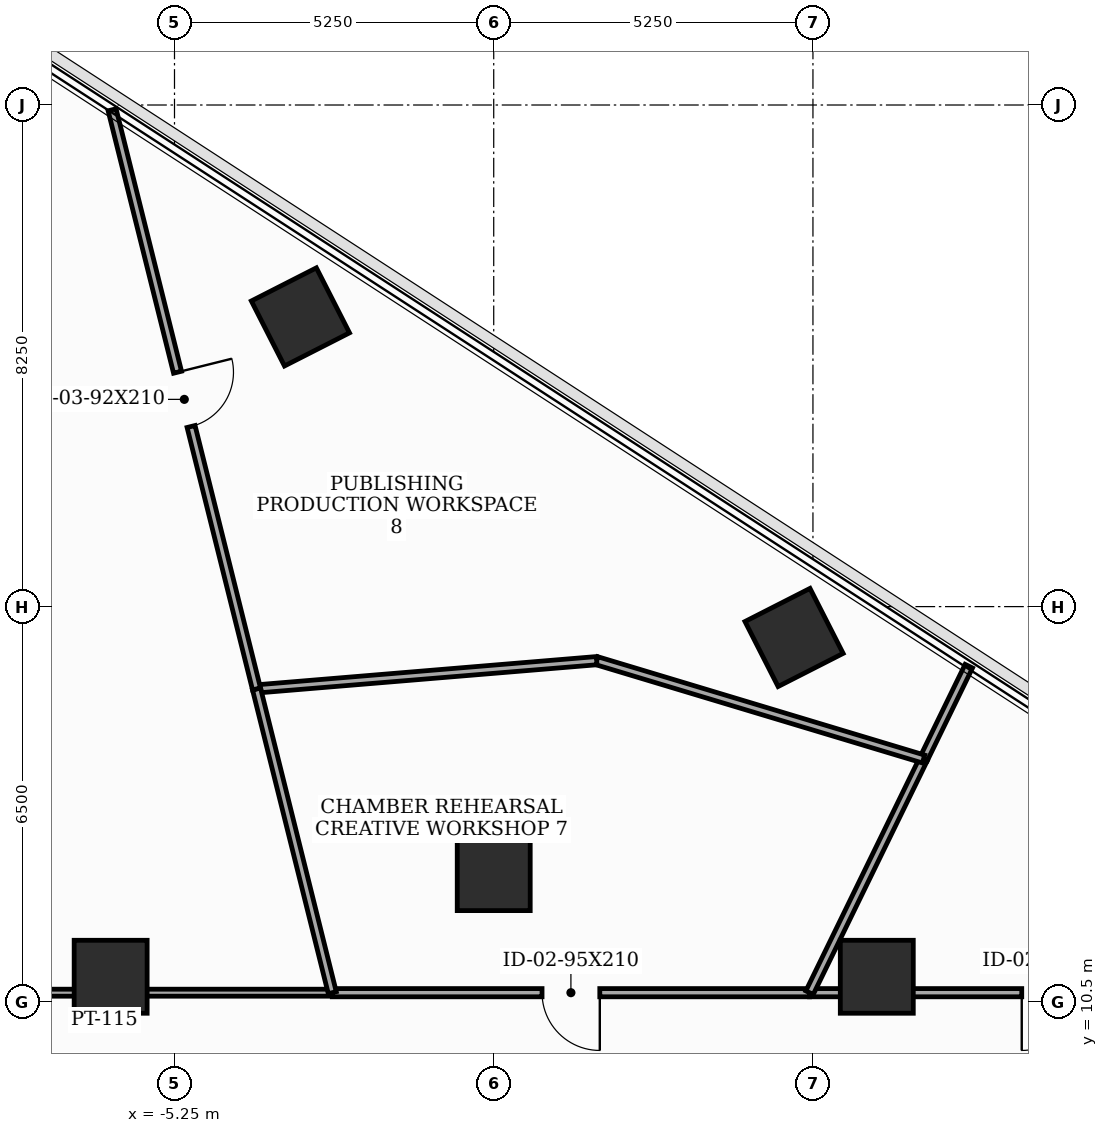
"""IFC4 building model, lengths in metres.
Left out: names, types, materials, properties, quantities, classifications, styles, units other than length and angle.
Written with IfcOpenShell. Run it as: python <this file> out.ifc"""

import sys

from ifc_helpers import new_model, si_unit, direction, frame, frame_2d, origin, origin_2d, place, context, subcontext, project, spatial, rectangle, extrude, element, fill, save


model = new_model("IFC4")
c1 = context("Model", 3, precision=1e-05, world=origin(), true_north=direction((0.0, 1.0)))
c2 = subcontext(c1, "Body", "Model", "MODEL_VIEW")
j1 = project(units=[si_unit("LENGTHUNIT", "METRE"), si_unit("PLANEANGLEUNIT", "RADIAN")], contexts=[c1])
p1 = place(None, origin())
s1 = spatial("IfcSite", under=j1, at=p1, CompositionType="ELEMENT")
p2 = place(p1, origin())
s2 = spatial("IfcBuilding", under=s1, at=p2, CompositionType="ELEMENT")
p3 = place(p2, frame((0.0, 0.0, 134.7)))
s3 = spatial("IfcBuildingStorey", under=s2, at=p3, CompositionType="ELEMENT", Elevation=134.7)
for number, where, z_axis, x_axis in (
    (1, (6.3, 10.912, 0.0), (0.0, 0.0, 1.0), (1.0, 0.0, 0.0)),
    (2, (0.0, 12.6, 0.0), (0.0, 0.0, 1.0), (1.0, 0.0, 0.0)),
    (3, (-6.3, 10.912, 0.0), (0.0, 0.0, 1.0), (1.0, 0.0, 0.0)),
    (4, (4.939, 16.492, 0.0), (0.0, 0.0, 1.0), (0.891, 0.454, 0.0)),
    (5, (-3.179, 21.765, 0.0), (0.0, 0.0, 1.0), (0.891, 0.454, 0.0)),
):
    element("IfcColumn", number, at=place(p3, frame(where, z_axis=z_axis, x_axis=x_axis)), inside=s3, PredefinedType="COLUMN", context=c2, shape_type="SweptSolid", body=[
        extrude(rectangle(XDim=1.2, YDim=1.2, at=origin_2d()), origin(), (0.0, 0.0, 1.0), 3.7),
    ])
p4 = place(p3, frame((10.15, 10.65, 0.0), z_axis=(0.0, 0.0, 1.0), x_axis=(-1.0, 0.0, 0.0)))
e6 = element("IfcWall", 6, at=p4, inside=s3, PredefinedType="PARTITIONING", context=c2, shape_type="SweptSolid", body=[
    extrude(rectangle(XDim=4.956, YDim=0.135, at=frame_2d((2.478, 0.0))), origin(), (0.0, 0.0, 1.0), 2.785),
])
p5 = place(p4, frame((0.516, 0.0, 0.0)))
e7 = element("IfcOpeningElement", 7, at=p5, cuts=e6, PredefinedType="OPENING", context=c2, shape_type="SweptSolid", body=[
    extrude(rectangle(XDim=0.95, YDim=2.1, at=frame_2d((0.475, 1.05))), frame((0.0, 0.077, 0.0), z_axis=(0.0, -1.0, 0.0), x_axis=(1.0, 0.0, 0.0)), (0.0, 0.0, 1.0), 0.155),
])
p6 = place(p3, frame((5.194, 10.65, 0.0), z_axis=(0.0, 0.0, 1.0), x_axis=(-1.0, 0.0, 0.0)))
e8 = element("IfcWall", 8, at=p6, inside=s3, PredefinedType="PARTITIONING", context=c2, shape_type="SweptSolid", body=[
    extrude(rectangle(XDim=7.849, YDim=0.135, at=frame_2d((3.925, 0.0))), origin(), (0.0, 0.0, 1.0), 2.785),
])
p7 = place(p6, frame((3.449, 0.0, 0.0)))
e9 = element("IfcOpeningElement", 9, at=p7, cuts=e8, PredefinedType="OPENING", context=c2, shape_type="SweptSolid", body=[
    extrude(rectangle(XDim=0.95, YDim=2.1, at=frame_2d((0.475, 1.05))), frame((0.0, 0.077, 0.0), z_axis=(0.0, -1.0, 0.0), x_axis=(1.0, 0.0, 0.0)), (0.0, 0.0, 1.0), 0.155),
])
p8 = place(p3, frame((-2.655, 10.65, 0.0), z_axis=(0.0, 0.0, 1.0), x_axis=(-1.0, 0.0, 0.0)))
e10 = element("IfcWall", 10, at=p8, inside=s3, PredefinedType="PARTITIONING", context=c2, shape_type="SweptSolid", body=[
    extrude(rectangle(XDim=7.495, YDim=0.115, at=frame_2d((3.748, 0.0))), origin(), (0.0, 0.0, 1.0), 2.785),
])
p9 = place(p3, frame((7.069, 14.493, 0.0), z_axis=(0.0, 0.0, 1.0), x_axis=(-0.438491124388, -0.898735519401, 0.0)))
e11 = element("IfcWall", 11, at=p9, inside=s3, PredefinedType="PARTITIONING", context=c2, shape_type="SweptSolid", body=[
    extrude(rectangle(XDim=4.276, YDim=0.135, at=frame_2d((2.138, 0.0))), origin(), (0.0, 0.0, 1.0), 2.785),
])
p10 = place(p3, frame((7.813, 16.021, 0.0), z_axis=(0.0, 0.0, 1.0), x_axis=(-0.437939658317, -0.899004369107, 0.0)))
e12 = element("IfcWall", 12, at=p10, inside=s3, PredefinedType="PARTITIONING", context=c2, shape_type="SweptSolid", body=[
    extrude(rectangle(XDim=1.7, YDim=0.135, at=frame_2d((0.85, 0.0))), origin(), (0.0, 0.0, 1.0), 2.985),
])
p11 = place(p3, frame((7.069, 14.493, 0.0), z_axis=(0.0, 0.0, 1.0), x_axis=(-0.957562573124, 0.288225464789, 0.0)))
e13 = element("IfcWall", 13, at=p11, inside=s3, PredefinedType="PARTITIONING", context=c2, shape_type="SweptSolid", body=[
    extrude(rectangle(XDim=5.614, YDim=0.135, at=frame_2d((2.807, 0.0))), origin(), (0.0, 0.0, 1.0), 2.885),
])
p12 = place(p3, frame((1.693, 16.111, 0.0), z_axis=(0.0, 0.0, 1.0), x_axis=(-0.996561637531, -0.082854707786, 0.0)))
e14 = element("IfcWall", 14, at=p12, inside=s3, PredefinedType="PARTITIONING", context=c2, shape_type="SweptSolid", body=[
    extrude(rectangle(XDim=5.613, YDim=0.135, at=frame_2d((2.807, 0.0))), origin(), (0.0, 0.0, 1.0), 2.885),
])
p13 = place(p3, frame((-3.901, 15.646, 0.0), z_axis=(0.0, 0.0, 1.0), x_axis=(0.241955453095, -0.970287358836, 0.0)))
e15 = element("IfcWall", 15, at=p13, inside=s3, PredefinedType="PARTITIONING", context=c2, shape_type="SweptSolid", body=[
    extrude(rectangle(XDim=5.149, YDim=0.135, at=frame_2d((2.575, 0.0))), origin(), (0.0, 0.0, 1.0), 2.785),
])
p14 = place(p3, frame((-6.276, 25.171, 0.0), z_axis=(0.0, 0.0, 1.0), x_axis=(0.241962105276, -0.970285699993, 0.0)))
e16 = element("IfcWall", 16, at=p14, inside=s3, PredefinedType="PARTITIONING", context=c2, shape_type="SweptSolid", body=[
    extrude(rectangle(XDim=9.817, YDim=0.135, at=frame_2d((4.908, 0.0))), origin(), (0.0, 0.0, 1.0), 2.985),
])
p15 = place(p14, frame((4.448, 0.0, 0.0)))
e17 = element("IfcOpeningElement", 17, at=p15, cuts=e16, PredefinedType="OPENING", context=c2, shape_type="SweptSolid", body=[
    extrude(rectangle(XDim=0.92, YDim=2.1, at=frame_2d((0.46, 1.05))), frame((0.0, 0.077, 0.0), z_axis=(0.0, -1.0, 0.0), x_axis=(1.0, 0.0, 0.0)), (0.0, 0.0, 1.0), 0.155),
])
p16 = place(p5, origin())
e18 = element("IfcDoor", 18, at=p16, inside=s3, OperationType="SINGLE_SWING_RIGHT", PredefinedType="DOOR", context=c2, shape_type="SweptSolid", body=[
    extrude(rectangle(XDim=0.95, YDim=2.1, at=frame_2d((0.475, 1.05))), frame((0.0, 0.025, 0.0), z_axis=(0.0, -1.0, 0.0), x_axis=(1.0, 0.0, 0.0)), (0.0, 0.0, 1.0), 0.05),
])
fill(e7, e18)
p17 = place(p7, origin())
e19 = element("IfcDoor", 19, at=p17, inside=s3, OperationType="SINGLE_SWING_LEFT", PredefinedType="DOOR", context=c2, shape_type="SweptSolid", body=[
    extrude(rectangle(XDim=0.95, YDim=2.1, at=frame_2d((0.475, 1.05))), frame((0.0, 0.025, 0.0), z_axis=(0.0, -1.0, 0.0), x_axis=(1.0, 0.0, 0.0)), (0.0, 0.0, 1.0), 0.05),
])
fill(e9, e19)
p18 = place(p15, origin())
e20 = element("IfcDoor", 20, at=p18, inside=s3, OperationType="SINGLE_SWING_LEFT", PredefinedType="DOOR", context=c2, shape_type="SweptSolid", body=[
    extrude(rectangle(XDim=0.92, YDim=2.1, at=frame_2d((0.46, 1.05))), frame((0.0, 0.025, 0.0), z_axis=(0.0, -1.0, 0.0), x_axis=(1.0, 0.0, 0.0)), (0.0, 0.0, 1.0), 0.05),
])
fill(e17, e20)
save(model, sys.argv[1])
